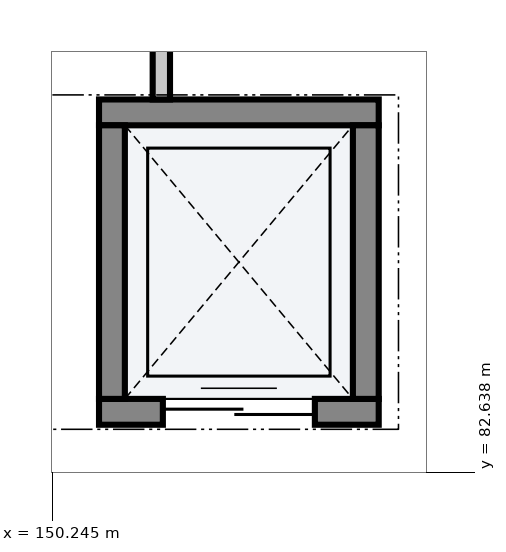
"""IFC4 building model, lengths in metres.
Left out: names, types, materials, properties, quantities, classifications, styles, units other than length and angle.
Written with IfcOpenShell. Run it as: python <this file> out.ifc"""

import sys

from ifc_helpers import new_model, si_unit, direction, frame, frame_2d, origin, place, context, subcontext, project, spatial, rectangle, extrude, element, fill, save


model = new_model("IFC4")
c1 = context("Model", 3, precision=1e-05, world=origin(), true_north=direction((0.0, 1.0)))
c2 = subcontext(c1, "Body", "Model", "MODEL_VIEW")
j1 = project(units=[si_unit("LENGTHUNIT", "METRE"), si_unit("PLANEANGLEUNIT", "RADIAN")], contexts=[c1])
p1 = place(None, origin())
s1 = spatial("IfcSite", under=j1, at=p1, CompositionType="ELEMENT")
p2 = place(p1, origin())
s2 = spatial("IfcBuilding", under=s1, at=p2, CompositionType="ELEMENT")
p3 = place(p2, frame((0.0, 0.0, 19.8)))
s3 = spatial("IfcBuildingStorey", under=s2, at=p3, CompositionType="ELEMENT", Elevation=19.8)
p4 = place(p3, frame((150.86, 83.43, 0.0), z_axis=(0.0, 0.0, 1.0), x_axis=(1.0, 0.0, 0.0)))
e1 = element("IfcWall", 1, at=p4, inside=s3, PredefinedType="SHEAR", context=c2, shape_type="SweptSolid", body=[
    extrude(rectangle(XDim=3.68, YDim=0.34, at=frame_2d((1.84, 0.0))), origin(), (0.0, 0.0, 1.0), 4.48),
])
p5 = place(p4, frame((0.84, 0.0, 0.0)))
e2 = element("IfcOpeningElement", 2, at=p5, cuts=e1, PredefinedType="OPENING", context=c2, shape_type="SweptSolid", body=[
    extrude(rectangle(XDim=2.0, YDim=2.4, at=frame_2d((1.0, 1.2))), frame((0.0, 0.182, 0.0), z_axis=(0.0, -1.0, 0.0), x_axis=(1.0, 0.0, 0.0)), (0.0, 0.0, 1.0), 0.364),
])
p6 = place(p3, frame((150.86, 87.37, 0.0), z_axis=(0.0, 0.0, 1.0), x_axis=(1.0, 0.0, 0.0)))
e3 = element("IfcWall", 3, at=p6, inside=s3, PredefinedType="SHEAR", context=c2, shape_type="SweptSolid", body=[
    extrude(rectangle(XDim=3.68, YDim=0.34, at=frame_2d((1.84, 0.0))), origin(), (0.0, 0.0, 1.0), 4.48),
])
for number, where, z_axis, x_axis in (
    (4, (151.03, 83.6, 0.0), (0.0, 0.0, 1.0), (0.0, 1.0, 0.0)),
    (5, (154.37, 83.6, 0.0), (0.0, 0.0, 1.0), (0.0, 1.0, 0.0)),
):
    element("IfcWall", number, at=place(p3, frame(where, z_axis=z_axis, x_axis=x_axis)), inside=s3, PredefinedType="SHEAR", context=c2, shape_type="SweptSolid", body=[
        extrude(rectangle(XDim=3.6, YDim=0.34, at=frame_2d((1.8, 0.0))), origin(), (0.0, 0.0, 1.0), 4.48),
    ])
p7 = place(p3, frame((151.68, 87.54, 0.0), z_axis=(0.0, 0.0, 1.0), x_axis=(0.0, 1.0, 0.0)))
e6 = element("IfcWall", 6, at=p7, inside=s3, PredefinedType="PARTITIONING", context=c2, shape_type="SweptSolid", body=[
    extrude(rectangle(XDim=18.186, YDim=0.228, at=frame_2d((9.093, 0.0))), origin(), (0.0, 0.0, 1.0), 4.48),
])
p8 = place(p5, origin())
e7 = element("IfcDoor", 7, at=p8, inside=s3, OperationType="DOUBLE_DOOR_SLIDING", PredefinedType="DOOR", context=c2, shape_type="SweptSolid", body=[
    extrude(rectangle(XDim=2.0, YDim=2.4, at=frame_2d((1.0, 1.2))), frame((0.0, 0.025, 0.0), z_axis=(0.0, -1.0, 0.0), x_axis=(1.0, 0.0, 0.0)), (0.0, 0.0, 1.0), 0.05),
])
fill(e2, e7)
save(model, sys.argv[1])
